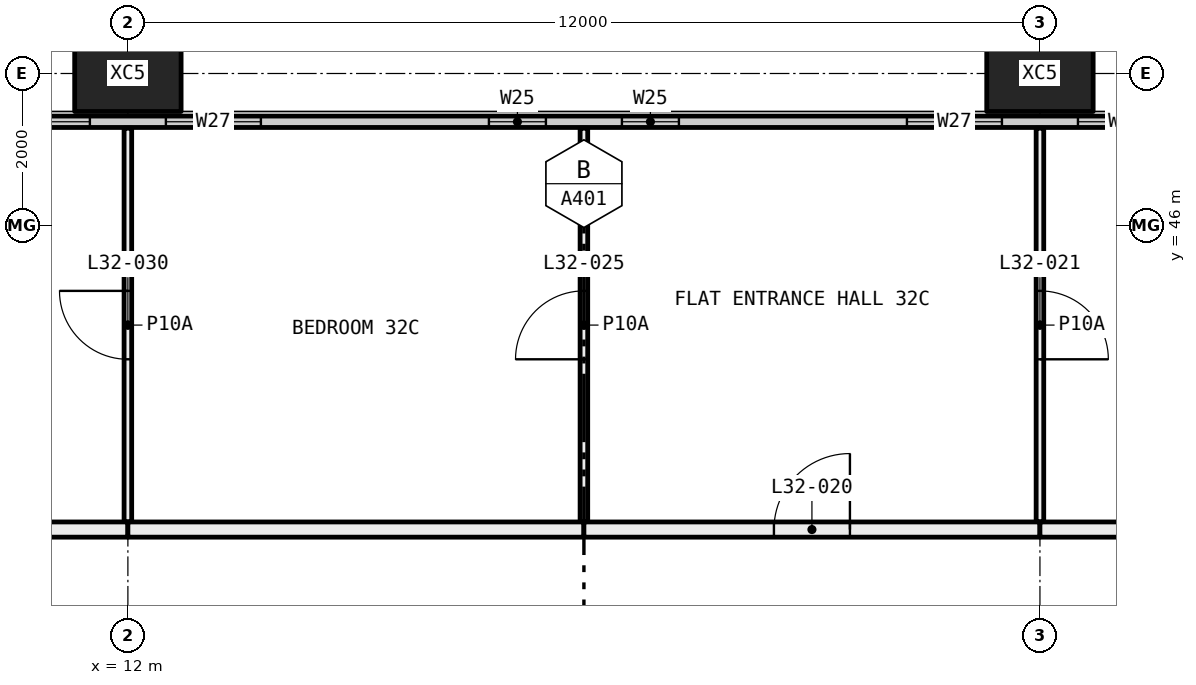
"""IFC4 building model, lengths in metres.
Left out: names, types, materials, properties, quantities, classifications, styles, units other than length and angle.
Written with IfcOpenShell. Run it as: python <this file> out.ifc"""

import sys

from ifc_helpers import new_model, si_unit, direction, frame, frame_2d, origin, origin_2d, place, context, subcontext, project, spatial, rectangle, hollow_rectangle, extrude, element, fill, save


model = new_model("IFC4")
c1 = context("Model", 3, precision=1e-05, world=origin(), true_north=direction((0.0, 1.0)))
c2 = subcontext(c1, "Body", "Model", "MODEL_VIEW")
j1 = project(units=[si_unit("LENGTHUNIT", "METRE"), si_unit("PLANEANGLEUNIT", "RADIAN")], contexts=[c1])
p1 = place(None, origin())
s1 = spatial("IfcSite", under=j1, at=p1, CompositionType="ELEMENT")
p2 = place(p1, origin())
s2 = spatial("IfcBuilding", under=s1, at=p2, CompositionType="ELEMENT")
p3 = place(p2, frame((0.0, 0.0, 124.2)))
s3 = spatial("IfcBuildingStorey", under=s2, at=p3, CompositionType="ELEMENT", Elevation=124.2)
for number, where, z_axis, x_axis in (
    (1, (12.0, 48.0, -0.4), (0.0, 0.0, 1.0), (1.0, 0.0, 0.0)),
    (2, (24.0, 48.0, -0.4), (0.0, 0.0, 1.0), (1.0, 0.0, 0.0)),
):
    element("IfcColumn", number, at=place(p3, frame(where, z_axis=z_axis, x_axis=x_axis)), inside=s3, PredefinedType="COLUMN", context=c2, shape_type="SweptSolid", body=[
        extrude(hollow_rectangle(XDim=1.4, YDim=1.0, WallThickness=0.055, at=origin_2d()), origin(), (0.0, 0.0, 1.0), 3.45),
    ])
p4 = place(p3, frame((6.56, 47.365, 0.0), z_axis=(0.0, 0.0, 1.0), x_axis=(1.0, 0.0, 0.0)))
e3 = element("IfcWall", 3, at=p4, inside=s3, PredefinedType="ELEMENTEDWALL", context=c2, shape_type="SweptSolid", body=[
    extrude(rectangle(XDim=58.88, YDim=0.15, at=frame_2d((29.44, 0.0))), origin(), (0.0, 0.0, 1.0), 3.05),
])
p5 = place(p4, frame((0.44, 0.0, 0.45)))
e4 = element("IfcOpeningElement", 4, at=p5, cuts=e3, PredefinedType="OPENING", context=c2, shape_type="SweptSolid", body=[
    extrude(rectangle(XDim=4.5, YDim=2.55, at=frame_2d((2.25, 1.275))), frame((0.0, 0.085, 0.0), z_axis=(0.0, -1.0, 0.0), x_axis=(1.0, 0.0, 0.0)), (0.0, 0.0, 1.0), 0.17),
])
p6 = place(p4, frame((5.94, 0.0, 0.45)))
e5 = element("IfcOpeningElement", 5, at=p6, cuts=e3, PredefinedType="OPENING", context=c2, shape_type="SweptSolid", body=[
    extrude(rectangle(XDim=1.25, YDim=2.55, at=frame_2d((0.625, 1.275))), frame((0.0, 0.085, 0.0), z_axis=(0.0, -1.0, 0.0), x_axis=(1.0, 0.0, 0.0)), (0.0, 0.0, 1.0), 0.17),
])
p7 = place(p4, frame((10.19, 0.0, 0.45)))
e6 = element("IfcOpeningElement", 6, at=p7, cuts=e3, PredefinedType="OPENING", context=c2, shape_type="SweptSolid", body=[
    extrude(rectangle(XDim=0.75, YDim=2.55, at=frame_2d((0.375, 1.275))), frame((0.0, 0.085, 0.0), z_axis=(0.0, -1.0, 0.0), x_axis=(1.0, 0.0, 0.0)), (0.0, 0.0, 1.0), 0.17),
])
p8 = place(p4, frame((11.94, 0.0, 0.45)))
e7 = element("IfcOpeningElement", 7, at=p8, cuts=e3, PredefinedType="OPENING", context=c2, shape_type="SweptSolid", body=[
    extrude(rectangle(XDim=0.75, YDim=2.55, at=frame_2d((0.375, 1.275))), frame((0.0, 0.085, 0.0), z_axis=(0.0, -1.0, 0.0), x_axis=(1.0, 0.0, 0.0)), (0.0, 0.0, 1.0), 0.17),
])
p9 = place(p4, frame((15.69, 0.0, 0.45)))
e8 = element("IfcOpeningElement", 8, at=p9, cuts=e3, PredefinedType="OPENING", context=c2, shape_type="SweptSolid", body=[
    extrude(rectangle(XDim=1.25, YDim=2.55, at=frame_2d((0.625, 1.275))), frame((0.0, 0.085, 0.0), z_axis=(0.0, -1.0, 0.0), x_axis=(1.0, 0.0, 0.0)), (0.0, 0.0, 1.0), 0.17),
])
p10 = place(p4, frame((17.94, 0.0, 0.45)))
e9 = element("IfcOpeningElement", 9, at=p10, cuts=e3, PredefinedType="OPENING", context=c2, shape_type="SweptSolid", body=[
    extrude(rectangle(XDim=1.25, YDim=2.55, at=frame_2d((0.625, 1.275))), frame((0.0, 0.085, 0.0), z_axis=(0.0, -1.0, 0.0), x_axis=(1.0, 0.0, 0.0)), (0.0, 0.0, 1.0), 0.17),
])
p11 = place(p4, frame((22.19, 0.0, 0.45)))
e10 = element("IfcOpeningElement", 10, at=p11, cuts=e3, PredefinedType="OPENING", context=c2, shape_type="SweptSolid", body=[
    extrude(rectangle(XDim=0.75, YDim=2.55, at=frame_2d((0.375, 1.275))), frame((0.0, 0.085, 0.0), z_axis=(0.0, -1.0, 0.0), x_axis=(1.0, 0.0, 0.0)), (0.0, 0.0, 1.0), 0.17),
])
p12 = place(p4, frame((23.94, 0.0, 0.45)))
e11 = element("IfcOpeningElement", 11, at=p12, cuts=e3, PredefinedType="OPENING", context=c2, shape_type="SweptSolid", body=[
    extrude(rectangle(XDim=0.75, YDim=2.55, at=frame_2d((0.375, 1.275))), frame((0.0, 0.085, 0.0), z_axis=(0.0, -1.0, 0.0), x_axis=(1.0, 0.0, 0.0)), (0.0, 0.0, 1.0), 0.17),
])
p13 = place(p4, frame((27.69, 0.0, 0.45)))
e12 = element("IfcOpeningElement", 12, at=p13, cuts=e3, PredefinedType="OPENING", context=c2, shape_type="SweptSolid", body=[
    extrude(rectangle(XDim=1.25, YDim=2.55, at=frame_2d((0.625, 1.275))), frame((0.0, 0.085, 0.0), z_axis=(0.0, -1.0, 0.0), x_axis=(1.0, 0.0, 0.0)), (0.0, 0.0, 1.0), 0.17),
])
p14 = place(p4, frame((29.94, 0.0, 0.45)))
e13 = element("IfcOpeningElement", 13, at=p14, cuts=e3, PredefinedType="OPENING", context=c2, shape_type="SweptSolid", body=[
    extrude(rectangle(XDim=1.25, YDim=2.55, at=frame_2d((0.625, 1.275))), frame((0.0, 0.085, 0.0), z_axis=(0.0, -1.0, 0.0), x_axis=(1.0, 0.0, 0.0)), (0.0, 0.0, 1.0), 0.17),
])
p15 = place(p4, frame((34.19, 0.0, 0.45)))
e14 = element("IfcOpeningElement", 14, at=p15, cuts=e3, PredefinedType="OPENING", context=c2, shape_type="SweptSolid", body=[
    extrude(rectangle(XDim=0.75, YDim=2.55, at=frame_2d((0.375, 1.275))), frame((0.0, 0.085, 0.0), z_axis=(0.0, -1.0, 0.0), x_axis=(1.0, 0.0, 0.0)), (0.0, 0.0, 1.0), 0.17),
])
p16 = place(p4, frame((35.94, 0.0, 0.45)))
e15 = element("IfcOpeningElement", 15, at=p16, cuts=e3, PredefinedType="OPENING", context=c2, shape_type="SweptSolid", body=[
    extrude(rectangle(XDim=0.75, YDim=2.55, at=frame_2d((0.375, 1.275))), frame((0.0, 0.085, 0.0), z_axis=(0.0, -1.0, 0.0), x_axis=(1.0, 0.0, 0.0)), (0.0, 0.0, 1.0), 0.17),
])
p17 = place(p4, frame((39.69, 0.0, 0.45)))
e16 = element("IfcOpeningElement", 16, at=p17, cuts=e3, PredefinedType="OPENING", context=c2, shape_type="SweptSolid", body=[
    extrude(rectangle(XDim=1.25, YDim=2.55, at=frame_2d((0.625, 1.275))), frame((0.0, 0.085, 0.0), z_axis=(0.0, -1.0, 0.0), x_axis=(1.0, 0.0, 0.0)), (0.0, 0.0, 1.0), 0.17),
])
p18 = place(p4, frame((41.94, 0.0, 0.45)))
e17 = element("IfcOpeningElement", 17, at=p18, cuts=e3, PredefinedType="OPENING", context=c2, shape_type="SweptSolid", body=[
    extrude(rectangle(XDim=1.25, YDim=2.55, at=frame_2d((0.625, 1.275))), frame((0.0, 0.085, 0.0), z_axis=(0.0, -1.0, 0.0), x_axis=(1.0, 0.0, 0.0)), (0.0, 0.0, 1.0), 0.17),
])
p19 = place(p4, frame((46.19, 0.0, 0.45)))
e18 = element("IfcOpeningElement", 18, at=p19, cuts=e3, PredefinedType="OPENING", context=c2, shape_type="SweptSolid", body=[
    extrude(rectangle(XDim=0.75, YDim=2.55, at=frame_2d((0.375, 1.275))), frame((0.0, 0.085, 0.0), z_axis=(0.0, -1.0, 0.0), x_axis=(1.0, 0.0, 0.0)), (0.0, 0.0, 1.0), 0.17),
])
p20 = place(p4, frame((47.94, 0.0, 0.45)))
e19 = element("IfcOpeningElement", 19, at=p20, cuts=e3, PredefinedType="OPENING", context=c2, shape_type="SweptSolid", body=[
    extrude(rectangle(XDim=0.75, YDim=2.55, at=frame_2d((0.375, 1.275))), frame((0.0, 0.085, 0.0), z_axis=(0.0, -1.0, 0.0), x_axis=(1.0, 0.0, 0.0)), (0.0, 0.0, 1.0), 0.17),
])
p21 = place(p4, frame((51.69, 0.0, 0.45)))
e20 = element("IfcOpeningElement", 20, at=p21, cuts=e3, PredefinedType="OPENING", context=c2, shape_type="SweptSolid", body=[
    extrude(rectangle(XDim=1.25, YDim=2.55, at=frame_2d((0.625, 1.275))), frame((0.0, 0.085, 0.0), z_axis=(0.0, -1.0, 0.0), x_axis=(1.0, 0.0, 0.0)), (0.0, 0.0, 1.0), 0.17),
])
p22 = place(p4, frame((53.94, 0.0, 0.45)))
e21 = element("IfcOpeningElement", 21, at=p22, cuts=e3, PredefinedType="OPENING", context=c2, shape_type="SweptSolid", body=[
    extrude(rectangle(XDim=4.5, YDim=2.55, at=frame_2d((2.25, 1.275))), frame((0.0, 0.085, 0.0), z_axis=(0.0, -1.0, 0.0), x_axis=(1.0, 0.0, 0.0)), (0.0, 0.0, 1.0), 0.17),
])
p23 = place(p3, frame((12.0, 42.1, 0.0), z_axis=(0.0, 0.0, 1.0), x_axis=(0.0, 1.0, 0.0)))
e22 = element("IfcWall", 22, at=p23, inside=s3, PredefinedType="PARTITIONING", context=c2, shape_type="SweptSolid", body=[
    extrude(rectangle(XDim=5.18, YDim=0.1, at=frame_2d((2.59, 0.0))), origin(), (0.0, 0.0, 1.0), 3.05),
])
p24 = place(p23, frame((2.14, 0.0, 0.0)))
e23 = element("IfcOpeningElement", 23, at=p24, cuts=e22, PredefinedType="OPENING", context=c2, shape_type="SweptSolid", body=[
    extrude(rectangle(XDim=0.9, YDim=2.1, at=frame_2d((0.45, 1.05))), frame((0.0, 0.06, 0.0), z_axis=(0.0, -1.0, 0.0), x_axis=(1.0, 0.0, 0.0)), (0.0, 0.0, 1.0), 0.12),
])
p25 = place(p3, frame((10.2, 42.0, 0.0), z_axis=(0.0, 0.0, 1.0), x_axis=(1.0, 0.0, 0.0)))
e24 = element("IfcWall", 24, at=p25, inside=s3, PredefinedType="PARTITIONING", context=c2, shape_type="SweptSolid", body=[
    extrude(rectangle(XDim=1.8, YDim=0.2, at=frame_2d((0.9, 0.0))), origin(), (0.0, 0.0, 1.0), 3.05),
])
p26 = place(p3, frame((18.0, 42.1, 0.0), z_axis=(0.0, 0.0, 1.0), x_axis=(0.0, 1.0, 0.0)))
e25 = element("IfcWall", 25, at=p26, inside=s3, PredefinedType="PARTITIONING", context=c2, shape_type="SweptSolid", body=[
    extrude(rectangle(XDim=5.18, YDim=0.1, at=frame_2d((2.59, 0.0))), origin(), (0.0, 0.0, 1.0), 3.05),
])
p27 = place(p26, frame((2.14, 0.0, 0.0)))
e26 = element("IfcOpeningElement", 26, at=p27, cuts=e25, PredefinedType="OPENING", context=c2, shape_type="SweptSolid", body=[
    extrude(rectangle(XDim=0.9, YDim=2.1, at=frame_2d((0.45, 1.05))), frame((0.0, 0.06, 0.0), z_axis=(0.0, -1.0, 0.0), x_axis=(1.0, 0.0, 0.0)), (0.0, 0.0, 1.0), 0.12),
])
p28 = place(p3, frame((12.0, 42.0, 0.0), z_axis=(0.0, 0.0, 1.0), x_axis=(1.0, 0.0, 0.0)))
e27 = element("IfcWall", 27, at=p28, inside=s3, PredefinedType="PARTITIONING", context=c2, shape_type="SweptSolid", body=[
    extrude(rectangle(XDim=6.0, YDim=0.2, at=frame_2d((3.0, 0.0))), origin(), (0.0, 0.0, 1.0), 3.05),
])
p29 = place(p3, frame((24.0, 42.1, 0.0), z_axis=(0.0, 0.0, 1.0), x_axis=(0.0, 1.0, 0.0)))
e28 = element("IfcWall", 28, at=p29, inside=s3, PredefinedType="PARTITIONING", context=c2, shape_type="SweptSolid", body=[
    extrude(rectangle(XDim=5.18, YDim=0.1, at=frame_2d((2.59, 0.0))), origin(), (0.0, 0.0, 1.0), 3.05),
])
p30 = place(p29, frame((2.14, 0.0, 0.0)))
e29 = element("IfcOpeningElement", 29, at=p30, cuts=e28, PredefinedType="OPENING", context=c2, shape_type="SweptSolid", body=[
    extrude(rectangle(XDim=0.9, YDim=2.1, at=frame_2d((0.45, 1.05))), frame((0.0, 0.06, 0.0), z_axis=(0.0, -1.0, 0.0), x_axis=(1.0, 0.0, 0.0)), (0.0, 0.0, 1.0), 0.12),
])
p31 = place(p3, frame((18.0, 42.0, 0.0), z_axis=(0.0, 0.0, 1.0), x_axis=(1.0, 0.0, 0.0)))
e30 = element("IfcWall", 30, at=p31, inside=s3, PredefinedType="PARTITIONING", context=c2, shape_type="SweptSolid", body=[
    extrude(rectangle(XDim=6.0, YDim=0.2, at=frame_2d((3.0, 0.0))), origin(), (0.0, 0.0, 1.0), 3.05),
])
p32 = place(p31, frame((2.5, 0.0, 0.0)))
e31 = element("IfcOpeningElement", 31, at=p32, cuts=e30, PredefinedType="OPENING", context=c2, shape_type="SweptSolid", body=[
    extrude(rectangle(XDim=1.0, YDim=2.1, at=frame_2d((0.5, 1.05))), frame((0.0, 0.11, 0.0), z_axis=(0.0, -1.0, 0.0), x_axis=(1.0, 0.0, 0.0)), (0.0, 0.0, 1.0), 0.22),
])
p33 = place(p3, frame((24.0, 42.0, 0.0), z_axis=(0.0, 0.0, 1.0), x_axis=(1.0, 0.0, 0.0)))
e32 = element("IfcWall", 32, at=p33, inside=s3, PredefinedType="PARTITIONING", context=c2, shape_type="SweptSolid", body=[
    extrude(rectangle(XDim=1.9, YDim=0.2, at=frame_2d((0.95, 0.0))), origin(), (0.0, 0.0, 1.0), 3.05),
])
p34 = place(p5, origin())
e33 = element("IfcWindow", 33, at=p34, inside=s3, PartitioningType="SINGLE_PANEL", PredefinedType="WINDOW", context=c2, shape_type="SweptSolid", body=[
    extrude(rectangle(XDim=4.5, YDim=2.55, at=frame_2d((2.25, 1.275))), frame((0.0, 0.03, 0.0), z_axis=(0.0, -1.0, 0.0), x_axis=(1.0, 0.0, 0.0)), (0.0, 0.0, 1.0), 0.06),
])
fill(e4, e33)
p35 = place(p6, origin())
e34 = element("IfcWindow", 34, at=p35, inside=s3, PartitioningType="SINGLE_PANEL", PredefinedType="WINDOW", context=c2, shape_type="SweptSolid", body=[
    extrude(rectangle(XDim=1.25, YDim=2.55, at=frame_2d((0.625, 1.275))), frame((0.0, 0.03, 0.0), z_axis=(0.0, -1.0, 0.0), x_axis=(1.0, 0.0, 0.0)), (0.0, 0.0, 1.0), 0.06),
])
fill(e5, e34)
p36 = place(p7, origin())
e35 = element("IfcWindow", 35, at=p36, inside=s3, PartitioningType="SINGLE_PANEL", PredefinedType="WINDOW", context=c2, shape_type="SweptSolid", body=[
    extrude(rectangle(XDim=0.75, YDim=2.55, at=frame_2d((0.375, 1.275))), frame((0.0, 0.03, 0.0), z_axis=(0.0, -1.0, 0.0), x_axis=(1.0, 0.0, 0.0)), (0.0, 0.0, 1.0), 0.06),
])
fill(e6, e35)
p37 = place(p8, origin())
e36 = element("IfcWindow", 36, at=p37, inside=s3, PartitioningType="SINGLE_PANEL", PredefinedType="WINDOW", context=c2, shape_type="SweptSolid", body=[
    extrude(rectangle(XDim=0.75, YDim=2.55, at=frame_2d((0.375, 1.275))), frame((0.0, 0.03, 0.0), z_axis=(0.0, -1.0, 0.0), x_axis=(1.0, 0.0, 0.0)), (0.0, 0.0, 1.0), 0.06),
])
fill(e7, e36)
p38 = place(p9, origin())
e37 = element("IfcWindow", 37, at=p38, inside=s3, PartitioningType="SINGLE_PANEL", PredefinedType="WINDOW", context=c2, shape_type="SweptSolid", body=[
    extrude(rectangle(XDim=1.25, YDim=2.55, at=frame_2d((0.625, 1.275))), frame((0.0, 0.03, 0.0), z_axis=(0.0, -1.0, 0.0), x_axis=(1.0, 0.0, 0.0)), (0.0, 0.0, 1.0), 0.06),
])
fill(e8, e37)
p39 = place(p10, origin())
e38 = element("IfcWindow", 38, at=p39, inside=s3, PartitioningType="SINGLE_PANEL", PredefinedType="WINDOW", context=c2, shape_type="SweptSolid", body=[
    extrude(rectangle(XDim=1.25, YDim=2.55, at=frame_2d((0.625, 1.275))), frame((0.0, 0.03, 0.0), z_axis=(0.0, -1.0, 0.0), x_axis=(1.0, 0.0, 0.0)), (0.0, 0.0, 1.0), 0.06),
])
fill(e9, e38)
p40 = place(p32, origin())
e39 = element("IfcDoor", 39, at=p40, inside=s3, OperationType="SINGLE_SWING_LEFT", PredefinedType="DOOR", context=c2, shape_type="SweptSolid", body=[
    extrude(rectangle(XDim=1.0, YDim=2.1, at=frame_2d((0.5, 1.05))), frame((0.0, 0.025, 0.0), z_axis=(0.0, -1.0, 0.0), x_axis=(1.0, 0.0, 0.0)), (0.0, 0.0, 1.0), 0.05),
])
fill(e31, e39)
p41 = place(p30, frame((0.9, 0.0, 0.0), x_axis=(-1.0, 0.0, 0.0)))
e40 = element("IfcDoor", 40, at=p41, inside=s3, OperationType="SINGLE_SWING_LEFT", PredefinedType="DOOR", context=c2, shape_type="SweptSolid", body=[
    extrude(rectangle(XDim=0.9, YDim=2.1, at=frame_2d((0.45, 1.05))), frame((0.0, 0.025, 0.0), z_axis=(0.0, -1.0, 0.0), x_axis=(1.0, 0.0, 0.0)), (0.0, 0.0, 1.0), 0.05),
])
fill(e29, e40)
p42 = place(p27, origin())
e41 = element("IfcDoor", 41, at=p42, inside=s3, OperationType="SINGLE_SWING_RIGHT", PredefinedType="DOOR", context=c2, shape_type="SweptSolid", body=[
    extrude(rectangle(XDim=0.9, YDim=2.1, at=frame_2d((0.45, 1.05))), frame((0.0, 0.025, 0.0), z_axis=(0.0, -1.0, 0.0), x_axis=(1.0, 0.0, 0.0)), (0.0, 0.0, 1.0), 0.05),
])
fill(e26, e41)
p43 = place(p24, origin())
e42 = element("IfcDoor", 42, at=p43, inside=s3, OperationType="SINGLE_SWING_LEFT", PredefinedType="DOOR", context=c2, shape_type="SweptSolid", body=[
    extrude(rectangle(XDim=0.9, YDim=2.1, at=frame_2d((0.45, 1.05))), frame((0.0, 0.025, 0.0), z_axis=(0.0, -1.0, 0.0), x_axis=(1.0, 0.0, 0.0)), (0.0, 0.0, 1.0), 0.05),
])
fill(e23, e42)
save(model, sys.argv[1])
